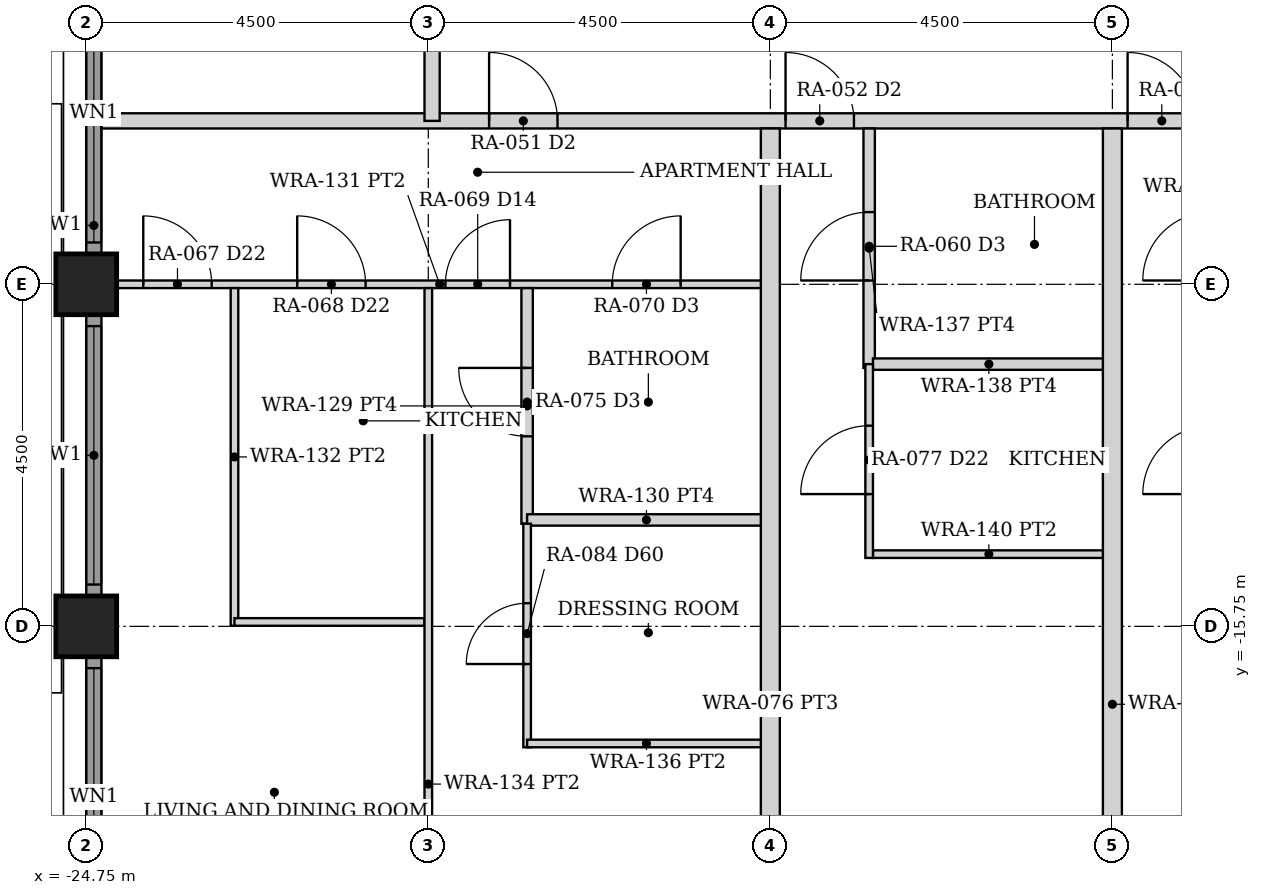
"""IFC4 building model, lengths in metres.
Left out: names, types, materials, properties, quantities, classifications, styles, units other than length and angle.
Written with IfcOpenShell. Run it as: python <this file> out.ifc"""

import sys

from ifc_helpers import new_model, si_unit, direction, frame, frame_2d, origin, origin_2d, place, context, subcontext, project, spatial, rectangle, hollow_rectangle, extrude, element, fill, save


model = new_model("IFC4")
c1 = context("Model", 3, precision=1e-05, world=origin(), true_north=direction((0.0, 1.0)))
c2 = subcontext(c1, "Body", "Model", "MODEL_VIEW")
j1 = project(units=[si_unit("LENGTHUNIT", "METRE"), si_unit("PLANEANGLEUNIT", "RADIAN")], contexts=[c1])
p1 = place(None, origin())
s1 = spatial("IfcSite", under=j1, at=p1, CompositionType="ELEMENT")
p2 = place(p1, origin())
s2 = spatial("IfcBuilding", under=s1, at=p2, CompositionType="ELEMENT")
p3 = place(p2, frame((0.0, 0.0, 26.5)))
s3 = spatial("IfcBuildingStorey", under=s2, at=p3, CompositionType="ELEMENT", Elevation=26.5)
for number, where, z_axis, x_axis in (
    (1, (-24.75, -15.75, 0.0), (0.0, 0.0, 1.0), (1.0, 0.0, 0.0)),
    (2, (-24.75, -11.25, 0.0), (0.0, 0.0, 1.0), (1.0, 0.0, 0.0)),
):
    element("IfcColumn", number, at=place(p3, frame(where, z_axis=z_axis, x_axis=x_axis)), inside=s3, PredefinedType="COLUMN", context=c2, shape_type="SweptSolid", body=[
        extrude(hollow_rectangle(XDim=0.8, YDim=0.8, WallThickness=0.08, at=origin_2d()), origin(), (0.0, 0.0, 1.0), 3.5),
    ])
p4 = place(p3, frame((-24.65, -19.845, 0.0), z_axis=(0.0, 0.0, 1.0), x_axis=(0.0, 1.0, 0.0)))
e3 = element("IfcWall", 3, at=p4, inside=s3, PredefinedType="SOLIDWALL", context=c2, shape_type="SweptSolid", body=[
    extrude(rectangle(XDim=3.69, YDim=0.2, at=frame_2d((1.845, 0.0))), origin(), (0.0, 0.0, 1.0), 2.379),
])
p5 = place(p4, frame((0.145, 0.0, 0.3)))
e4 = element("IfcOpeningElement", 4, at=p5, cuts=e3, PredefinedType="OPENING", context=c2, shape_type="SweptSolid", body=[
    extrude(rectangle(XDim=3.4, YDim=1.929, at=frame_2d((1.7, 0.964))), frame((0.0, 0.11, 0.0), z_axis=(0.0, -1.0, 0.0), x_axis=(1.0, 0.0, 0.0)), (0.0, 0.0, 1.0), 0.22),
])
p6 = place(p3, frame((-24.65, -15.345, 0.0), z_axis=(0.0, 0.0, 1.0), x_axis=(0.0, 1.0, 0.0)))
e5 = element("IfcWall", 5, at=p6, inside=s3, PredefinedType="SOLIDWALL", context=c2, shape_type="SweptSolid", body=[
    extrude(rectangle(XDim=3.69, YDim=0.2, at=frame_2d((1.845, 0.0))), origin(), (0.0, 0.0, 1.0), 2.379),
])
p7 = place(p6, frame((0.145, 0.0, 0.3)))
e6 = element("IfcOpeningElement", 6, at=p7, cuts=e5, PredefinedType="OPENING", context=c2, shape_type="SweptSolid", body=[
    extrude(rectangle(XDim=3.4, YDim=1.929, at=frame_2d((1.7, 0.964))), frame((0.0, 0.11, 0.0), z_axis=(0.0, -1.0, 0.0), x_axis=(1.0, 0.0, 0.0)), (0.0, 0.0, 1.0), 0.22),
])
p8 = place(p3, frame((-24.65, -10.845, 0.0), z_axis=(0.0, 0.0, 1.0), x_axis=(0.0, 1.0, 0.0)))
e7 = element("IfcWall", 7, at=p8, inside=s3, PredefinedType="SOLIDWALL", context=c2, shape_type="SweptSolid", body=[
    extrude(rectangle(XDim=3.69, YDim=0.2, at=frame_2d((1.845, 0.0))), origin(), (0.0, 0.0, 1.0), 2.379),
])
p9 = place(p8, frame((0.145, 0.0, 0.3)))
e8 = element("IfcOpeningElement", 8, at=p9, cuts=e7, PredefinedType="OPENING", context=c2, shape_type="SweptSolid", body=[
    extrude(rectangle(XDim=3.4, YDim=1.929, at=frame_2d((1.7, 0.964))), frame((0.0, 0.11, 0.0), z_axis=(0.0, -1.0, 0.0), x_axis=(1.0, 0.0, 0.0)), (0.0, 0.0, 1.0), 0.22),
])
p10 = place(p3, frame((-24.55, -9.1, 0.0), z_axis=(0.0, 0.0, 1.0), x_axis=(1.0, 0.0, 0.0)))
e9 = element("IfcWall", 9, at=p10, inside=s3, PredefinedType="PARTITIONING", context=c2, shape_type="SweptSolid", body=[
    extrude(rectangle(XDim=49.1, YDim=0.2, at=frame_2d((24.55, 0.0))), origin(), (0.0, 0.0, 1.0), 2.373),
])
p11 = place(p10, frame((5.1, 0.0, 0.0)))
e10 = element("IfcOpeningElement", 10, at=p11, cuts=e9, PredefinedType="OPENING", context=c2, shape_type="SweptSolid", body=[
    extrude(rectangle(XDim=0.9, YDim=2.1, at=frame_2d((0.45, 1.05))), frame((0.0, 0.11, 0.0), z_axis=(0.0, -1.0, 0.0), x_axis=(1.0, 0.0, 0.0)), (0.0, 0.0, 1.0), 0.22),
])
p12 = place(p10, frame((9.0, 0.0, 0.0)))
e11 = element("IfcOpeningElement", 11, at=p12, cuts=e9, PredefinedType="OPENING", context=c2, shape_type="SweptSolid", body=[
    extrude(rectangle(XDim=0.9, YDim=2.1, at=frame_2d((0.45, 1.05))), frame((0.0, 0.11, 0.0), z_axis=(0.0, -1.0, 0.0), x_axis=(1.0, 0.0, 0.0)), (0.0, 0.0, 1.0), 0.22),
])
p13 = place(p10, frame((13.5, 0.0, 0.0)))
e12 = element("IfcOpeningElement", 12, at=p13, cuts=e9, PredefinedType="OPENING", context=c2, shape_type="SweptSolid", body=[
    extrude(rectangle(XDim=0.9, YDim=2.1, at=frame_2d((0.45, 1.05))), frame((0.0, 0.11, 0.0), z_axis=(0.0, -1.0, 0.0), x_axis=(1.0, 0.0, 0.0)), (0.0, 0.0, 1.0), 0.22),
])
p14 = place(p10, frame((18.0, 0.0, 0.0)))
e13 = element("IfcOpeningElement", 13, at=p14, cuts=e9, PredefinedType="OPENING", context=c2, shape_type="SweptSolid", body=[
    extrude(rectangle(XDim=0.9, YDim=2.1, at=frame_2d((0.45, 1.05))), frame((0.0, 0.11, 0.0), z_axis=(0.0, -1.0, 0.0), x_axis=(1.0, 0.0, 0.0)), (0.0, 0.0, 1.0), 0.22),
])
p15 = place(p10, frame((22.5, 0.0, 0.0)))
e14 = element("IfcOpeningElement", 14, at=p15, cuts=e9, PredefinedType="OPENING", context=c2, shape_type="SweptSolid", body=[
    extrude(rectangle(XDim=0.9, YDim=2.1, at=frame_2d((0.45, 1.05))), frame((0.0, 0.11, 0.0), z_axis=(0.0, -1.0, 0.0), x_axis=(1.0, 0.0, 0.0)), (0.0, 0.0, 1.0), 0.22),
])
p16 = place(p10, frame((27.0, 0.0, 0.0)))
e15 = element("IfcOpeningElement", 15, at=p16, cuts=e9, PredefinedType="OPENING", context=c2, shape_type="SweptSolid", body=[
    extrude(rectangle(XDim=0.9, YDim=2.1, at=frame_2d((0.45, 1.05))), frame((0.0, 0.11, 0.0), z_axis=(0.0, -1.0, 0.0), x_axis=(1.0, 0.0, 0.0)), (0.0, 0.0, 1.0), 0.22),
])
p17 = place(p10, frame((31.5, 0.0, 0.0)))
e16 = element("IfcOpeningElement", 16, at=p17, cuts=e9, PredefinedType="OPENING", context=c2, shape_type="SweptSolid", body=[
    extrude(rectangle(XDim=0.9, YDim=2.1, at=frame_2d((0.45, 1.05))), frame((0.0, 0.11, 0.0), z_axis=(0.0, -1.0, 0.0), x_axis=(1.0, 0.0, 0.0)), (0.0, 0.0, 1.0), 0.22),
])
p18 = place(p10, frame((36.0, 0.0, 0.0)))
e17 = element("IfcOpeningElement", 17, at=p18, cuts=e9, PredefinedType="OPENING", context=c2, shape_type="SweptSolid", body=[
    extrude(rectangle(XDim=0.9, YDim=2.1, at=frame_2d((0.45, 1.05))), frame((0.0, 0.11, 0.0), z_axis=(0.0, -1.0, 0.0), x_axis=(1.0, 0.0, 0.0)), (0.0, 0.0, 1.0), 0.22),
])
p19 = place(p10, frame((43.1, 0.0, 0.0)))
e18 = element("IfcOpeningElement", 18, at=p19, cuts=e9, PredefinedType="OPENING", context=c2, shape_type="SweptSolid", body=[
    extrude(rectangle(XDim=0.9, YDim=2.1, at=frame_2d((0.45, 1.05))), frame((0.0, 0.11, 0.0), z_axis=(0.0, -1.0, 0.0), x_axis=(1.0, 0.0, 0.0)), (0.0, 0.0, 1.0), 0.22),
])
p20 = place(p3, frame((-20.2, -9.1, 0.0), z_axis=(0.0, 0.0, 1.0), x_axis=(0.0, 1.0, 0.0)))
e19 = element("IfcWall", 19, at=p20, inside=s3, PredefinedType="PARTITIONING", context=c2, shape_type="SweptSolid", body=[
    extrude(rectangle(XDim=18.2, YDim=0.2, at=frame_2d((9.1, 0.0))), origin(), (0.0, 0.0, 1.0), 2.373),
])
p21 = place(p20, frame((8.6, 0.0, 0.0)))
e20 = element("IfcOpeningElement", 20, at=p21, cuts=e19, PredefinedType="OPENING", context=c2, shape_type="SweptSolid", body=[
    extrude(rectangle(XDim=1.0, YDim=2.1, at=frame_2d((0.5, 1.05))), frame((0.0, 0.11, 0.0), z_axis=(0.0, -1.0, 0.0), x_axis=(1.0, 0.0, 0.0)), (0.0, 0.0, 1.0), 0.22),
])
p22 = place(p3, frame((-24.35, -11.25, 0.0), z_axis=(0.0, 0.0, 1.0), x_axis=(1.0, 0.0, 0.0)))
e21 = element("IfcWall", 21, at=p22, inside=s3, PredefinedType="PARTITIONING", context=c2, shape_type="SweptSolid", body=[
    extrude(rectangle(XDim=8.5, YDim=0.1, at=frame_2d((4.25, 0.0))), origin(), (0.0, 0.0, 1.0), 2.373),
])
p23 = place(p22, frame((2.375, 0.0, 0.0)))
e22 = element("IfcOpeningElement", 22, at=p23, cuts=e21, PredefinedType="OPENING", context=c2, shape_type="SweptSolid", body=[
    extrude(rectangle(XDim=0.9, YDim=2.1, at=frame_2d((0.45, 1.05))), frame((0.0, 0.06, 0.0), z_axis=(0.0, -1.0, 0.0), x_axis=(1.0, 0.0, 0.0)), (0.0, 0.0, 1.0), 0.12),
])
p24 = place(p22, frame((0.35, 0.0, 0.0)))
e23 = element("IfcOpeningElement", 23, at=p24, cuts=e21, PredefinedType="OPENING", context=c2, shape_type="SweptSolid", body=[
    extrude(rectangle(XDim=0.9, YDim=2.1, at=frame_2d((0.45, 1.05))), frame((0.0, 0.06, 0.0), z_axis=(0.0, -1.0, 0.0), x_axis=(1.0, 0.0, 0.0)), (0.0, 0.0, 1.0), 0.12),
])
p25 = place(p22, frame((4.325, 0.0, 0.0)))
e24 = element("IfcOpeningElement", 24, at=p25, cuts=e21, PredefinedType="OPENING", context=c2, shape_type="SweptSolid", body=[
    extrude(rectangle(XDim=0.85, YDim=2.1, at=frame_2d((0.425, 1.05))), frame((0.0, 0.06, 0.0), z_axis=(0.0, -1.0, 0.0), x_axis=(1.0, 0.0, 0.0)), (0.0, 0.0, 1.0), 0.12),
])
p26 = place(p22, frame((6.52, 0.0, 0.0)))
e25 = element("IfcOpeningElement", 25, at=p26, cuts=e21, PredefinedType="OPENING", context=c2, shape_type="SweptSolid", body=[
    extrude(rectangle(XDim=0.9, YDim=2.1, at=frame_2d((0.45, 1.05))), frame((0.0, 0.06, 0.0), z_axis=(0.0, -1.0, 0.0), x_axis=(1.0, 0.0, 0.0)), (0.0, 0.0, 1.0), 0.12),
])
p27 = place(p3, frame((-22.8, -15.742, 0.0), z_axis=(0.0, 0.0, 1.0), x_axis=(0.0, 1.0, 0.0)))
e26 = element("IfcWall", 26, at=p27, inside=s3, PredefinedType="PARTITIONING", context=c2, shape_type="SweptSolid", body=[
    extrude(rectangle(XDim=4.442, YDim=0.1, at=frame_2d((2.221, 0.0))), origin(), (0.0, 0.0, 1.0), 2.373),
])
p28 = place(p3, frame((-22.8, -15.692, 0.0), z_axis=(0.0, 0.0, 1.0), x_axis=(1.0, 0.0, 0.0)))
e27 = element("IfcWall", 27, at=p28, inside=s3, PredefinedType="PARTITIONING", context=c2, shape_type="SweptSolid", body=[
    extrude(rectangle(XDim=2.5, YDim=0.1, at=frame_2d((1.25, 0.0))), origin(), (0.0, 0.0, 1.0), 2.373),
])
p29 = place(p3, frame((-20.25, -24.35, 0.0), z_axis=(0.0, 0.0, 1.0), x_axis=(0.0, 1.0, 0.0)))
e28 = element("IfcWall", 28, at=p29, inside=s3, PredefinedType="PARTITIONING", context=c2, shape_type="SweptSolid", body=[
    extrude(rectangle(XDim=13.05, YDim=0.1, at=frame_2d((6.525, 0.0))), origin(), (0.0, 0.0, 1.0), 2.373),
])
p30 = place(p3, frame((-18.95, -14.4, 0.0), z_axis=(0.0, 0.0, 1.0), x_axis=(0.0, 1.0, 0.0)))
e29 = element("IfcWall", 29, at=p30, inside=s3, PredefinedType="PARTITIONING", context=c2, shape_type="SweptSolid", body=[
    extrude(rectangle(XDim=3.1, YDim=0.15, at=frame_2d((1.55, 0.0))), origin(), (0.0, 0.0, 1.0), 2.373),
])
p31 = place(p30, frame((1.15, 0.0, 0.0)))
e30 = element("IfcOpeningElement", 30, at=p31, cuts=e29, PredefinedType="OPENING", context=c2, shape_type="SweptSolid", body=[
    extrude(rectangle(XDim=0.9, YDim=2.1, at=frame_2d((0.45, 1.05))), frame((0.0, 0.085, 0.0), z_axis=(0.0, -1.0, 0.0), x_axis=(1.0, 0.0, 0.0)), (0.0, 0.0, 1.0), 0.17),
])
p32 = place(p3, frame((-18.95, -14.35, 0.0), z_axis=(0.0, 0.0, 1.0), x_axis=(1.0, 0.0, 0.0)))
e31 = element("IfcWall", 31, at=p32, inside=s3, PredefinedType="PARTITIONING", context=c2, shape_type="SweptSolid", body=[
    extrude(rectangle(XDim=3.14, YDim=0.15, at=frame_2d((1.57, 0.0))), origin(), (0.0, 0.0, 1.0), 2.373),
])
p33 = place(p3, frame((-18.95, -17.341, 0.0), z_axis=(0.0, 0.0, 1.0), x_axis=(0.0, 1.0, 0.0)))
e32 = element("IfcWall", 32, at=p33, inside=s3, PredefinedType="PARTITIONING", context=c2, shape_type="SweptSolid", body=[
    extrude(rectangle(XDim=2.941, YDim=0.1, at=frame_2d((1.47, 0.0))), origin(), (0.0, 0.0, 1.0), 2.373),
])
p34 = place(p33, frame((1.095, 0.0, 0.0)))
e33 = element("IfcOpeningElement", 33, at=p34, cuts=e32, PredefinedType="OPENING", context=c2, shape_type="SweptSolid", body=[
    extrude(rectangle(XDim=0.8, YDim=2.1, at=frame_2d((0.4, 1.05))), frame((0.0, 0.06, 0.0), z_axis=(0.0, -1.0, 0.0), x_axis=(1.0, 0.0, 0.0)), (0.0, 0.0, 1.0), 0.12),
])
p35 = place(p3, frame((-18.95, -17.291, 0.0), z_axis=(0.0, 0.0, 1.0), x_axis=(1.0, 0.0, 0.0)))
e34 = element("IfcWall", 34, at=p35, inside=s3, PredefinedType="PARTITIONING", context=c2, shape_type="SweptSolid", body=[
    extrude(rectangle(XDim=3.14, YDim=0.1, at=frame_2d((1.57, 0.0))), origin(), (0.0, 0.0, 1.0), 2.373),
])
p36 = place(p3, frame((-14.45, -12.35, 0.0), z_axis=(0.0, 0.0, 1.0), x_axis=(0.0, 1.0, 0.0)))
e35 = element("IfcWall", 35, at=p36, inside=s3, PredefinedType="PARTITIONING", context=c2, shape_type="SweptSolid", body=[
    extrude(rectangle(XDim=3.15, YDim=0.15, at=frame_2d((1.575, 0.0))), origin(), (0.0, 0.0, 1.0), 2.373),
])
p37 = place(p36, frame((1.15, 0.0, 0.0)))
e36 = element("IfcOpeningElement", 36, at=p37, cuts=e35, PredefinedType="OPENING", context=c2, shape_type="SweptSolid", body=[
    extrude(rectangle(XDim=0.9, YDim=2.1, at=frame_2d((0.45, 1.05))), frame((0.0, 0.085, 0.0), z_axis=(0.0, -1.0, 0.0), x_axis=(1.0, 0.0, 0.0)), (0.0, 0.0, 1.0), 0.17),
])
p38 = place(p3, frame((-14.4, -12.3, 0.0), z_axis=(0.0, 0.0, 1.0), x_axis=(1.0, 0.0, 0.0)))
e37 = element("IfcWall", 37, at=p38, inside=s3, PredefinedType="PARTITIONING", context=c2, shape_type="SweptSolid", body=[
    extrude(rectangle(XDim=3.05, YDim=0.15, at=frame_2d((1.525, 0.0))), origin(), (0.0, 0.0, 1.0), 2.373),
])
p39 = place(p3, frame((-14.4, -14.8, 0.0), z_axis=(0.0, 0.0, 1.0), x_axis=(1.0, 0.0, 0.0)))
e38 = element("IfcWall", 38, at=p39, inside=s3, PredefinedType="PARTITIONING", context=c2, shape_type="SweptSolid", body=[
    extrude(rectangle(XDim=3.05, YDim=0.1, at=frame_2d((1.525, 0.0))), origin(), (0.0, 0.0, 1.0), 2.373),
])
p40 = place(p3, frame((-14.45, -14.85, 0.0), z_axis=(0.0, 0.0, 1.0), x_axis=(0.0, 1.0, 0.0)))
e39 = element("IfcWall", 39, at=p40, inside=s3, PredefinedType="PARTITIONING", context=c2, shape_type="SweptSolid", body=[
    extrude(rectangle(XDim=2.55, YDim=0.1, at=frame_2d((1.275, 0.0))), origin(), (0.0, 0.0, 1.0), 2.373),
])
p41 = place(p40, frame((0.84, 0.0, 0.0)))
e40 = element("IfcOpeningElement", 40, at=p41, cuts=e39, PredefinedType="OPENING", context=c2, shape_type="SweptSolid", body=[
    extrude(rectangle(XDim=0.9, YDim=2.1, at=frame_2d((0.45, 1.05))), frame((0.0, 0.06, 0.0), z_axis=(0.0, -1.0, 0.0), x_axis=(1.0, 0.0, 0.0)), (0.0, 0.0, 1.0), 0.12),
])
for number, where, z_axis, x_axis in (
    (41, (-15.75, -24.35, 0.0), (0.0, 0.0, 1.0), (0.0, 1.0, 0.0)),
    (42, (-11.25, -24.35, 0.0), (0.0, 0.0, 1.0), (0.0, 1.0, 0.0)),
):
    element("IfcWall", number, at=place(p3, frame(where, z_axis=z_axis, x_axis=x_axis)), inside=s3, PredefinedType="PARTITIONING", context=c2, shape_type="SweptSolid", body=[
        extrude(rectangle(XDim=15.15, YDim=0.25, at=frame_2d((7.575, 0.0))), origin(), (0.0, 0.0, 1.0), 2.373),
    ])
p42 = place(p5, origin())
e43 = element("IfcWindow", 43, at=p42, inside=s3, PartitioningType="SINGLE_PANEL", PredefinedType="WINDOW", context=c2, shape_type="SweptSolid", body=[
    extrude(rectangle(XDim=3.4, YDim=1.929, at=frame_2d((1.7, 0.964))), frame((0.0, 0.03, 0.0), z_axis=(0.0, -1.0, 0.0), x_axis=(1.0, 0.0, 0.0)), (0.0, 0.0, 1.0), 0.06),
])
fill(e4, e43)
p43 = place(p7, origin())
e44 = element("IfcWindow", 44, at=p43, inside=s3, PartitioningType="SINGLE_PANEL", PredefinedType="WINDOW", context=c2, shape_type="SweptSolid", body=[
    extrude(rectangle(XDim=3.4, YDim=1.929, at=frame_2d((1.7, 0.964))), frame((0.0, 0.03, 0.0), z_axis=(0.0, -1.0, 0.0), x_axis=(1.0, 0.0, 0.0)), (0.0, 0.0, 1.0), 0.06),
])
fill(e6, e44)
p44 = place(p9, origin())
e45 = element("IfcWindow", 45, at=p44, inside=s3, PartitioningType="SINGLE_PANEL", PredefinedType="WINDOW", context=c2, shape_type="SweptSolid", body=[
    extrude(rectangle(XDim=3.4, YDim=1.929, at=frame_2d((1.7, 0.964))), frame((0.0, 0.03, 0.0), z_axis=(0.0, -1.0, 0.0), x_axis=(1.0, 0.0, 0.0)), (0.0, 0.0, 1.0), 0.06),
])
fill(e8, e45)
p45 = place(p11, origin())
e46 = element("IfcDoor", 46, at=p45, inside=s3, OperationType="SINGLE_SWING_LEFT", PredefinedType="DOOR", context=c2, shape_type="SweptSolid", body=[
    extrude(rectangle(XDim=0.9, YDim=2.1, at=frame_2d((0.45, 1.05))), frame((0.0, 0.025, 0.0), z_axis=(0.0, -1.0, 0.0), x_axis=(1.0, 0.0, 0.0)), (0.0, 0.0, 1.0), 0.05),
])
fill(e10, e46)
p46 = place(p23, origin())
e47 = element("IfcDoor", 47, at=p46, inside=s3, OperationType="SINGLE_SWING_LEFT", PredefinedType="DOOR", context=c2, shape_type="SweptSolid", body=[
    extrude(rectangle(XDim=0.9, YDim=2.1, at=frame_2d((0.45, 1.05))), frame((0.0, 0.025, 0.0), z_axis=(0.0, -1.0, 0.0), x_axis=(1.0, 0.0, 0.0)), (0.0, 0.0, 1.0), 0.05),
])
fill(e22, e47)
p47 = place(p24, origin())
e48 = element("IfcDoor", 48, at=p47, inside=s3, OperationType="SINGLE_SWING_LEFT", PredefinedType="DOOR", context=c2, shape_type="SweptSolid", body=[
    extrude(rectangle(XDim=0.9, YDim=2.1, at=frame_2d((0.45, 1.05))), frame((0.0, 0.025, 0.0), z_axis=(0.0, -1.0, 0.0), x_axis=(1.0, 0.0, 0.0)), (0.0, 0.0, 1.0), 0.05),
])
fill(e23, e48)
p48 = place(p25, origin())
e49 = element("IfcDoor", 49, at=p48, inside=s3, OperationType="SINGLE_SWING_RIGHT", PredefinedType="DOOR", context=c2, shape_type="SweptSolid", body=[
    extrude(rectangle(XDim=0.85, YDim=2.1, at=frame_2d((0.425, 1.05))), frame((0.0, 0.025, 0.0), z_axis=(0.0, -1.0, 0.0), x_axis=(1.0, 0.0, 0.0)), (0.0, 0.0, 1.0), 0.05),
])
fill(e24, e49)
p49 = place(p31, origin())
e50 = element("IfcDoor", 50, at=p49, inside=s3, OperationType="SINGLE_SWING_RIGHT", PredefinedType="DOOR", context=c2, shape_type="SweptSolid", body=[
    extrude(rectangle(XDim=0.9, YDim=2.1, at=frame_2d((0.45, 1.05))), frame((0.0, 0.025, 0.0), z_axis=(0.0, -1.0, 0.0), x_axis=(1.0, 0.0, 0.0)), (0.0, 0.0, 1.0), 0.05),
])
fill(e30, e50)
p50 = place(p26, origin())
e51 = element("IfcDoor", 51, at=p50, inside=s3, OperationType="SINGLE_SWING_RIGHT", PredefinedType="DOOR", context=c2, shape_type="SweptSolid", body=[
    extrude(rectangle(XDim=0.9, YDim=2.1, at=frame_2d((0.45, 1.05))), frame((0.0, 0.025, 0.0), z_axis=(0.0, -1.0, 0.0), x_axis=(1.0, 0.0, 0.0)), (0.0, 0.0, 1.0), 0.05),
])
fill(e25, e51)
p51 = place(p34, origin())
e52 = element("IfcDoor", 52, at=p51, inside=s3, OperationType="SINGLE_SWING_LEFT", PredefinedType="DOOR", context=c2, shape_type="SweptSolid", body=[
    extrude(rectangle(XDim=0.8, YDim=2.1, at=frame_2d((0.4, 1.05))), frame((0.0, 0.025, 0.0), z_axis=(0.0, -1.0, 0.0), x_axis=(1.0, 0.0, 0.0)), (0.0, 0.0, 1.0), 0.05),
])
fill(e33, e52)
p52 = place(p12, origin())
e53 = element("IfcDoor", 53, at=p52, inside=s3, OperationType="SINGLE_SWING_LEFT", PredefinedType="DOOR", context=c2, shape_type="SweptSolid", body=[
    extrude(rectangle(XDim=0.9, YDim=2.1, at=frame_2d((0.45, 1.05))), frame((0.0, 0.025, 0.0), z_axis=(0.0, -1.0, 0.0), x_axis=(1.0, 0.0, 0.0)), (0.0, 0.0, 1.0), 0.05),
])
fill(e11, e53)
p53 = place(p37, origin())
e54 = element("IfcDoor", 54, at=p53, inside=s3, OperationType="SINGLE_SWING_LEFT", PredefinedType="DOOR", context=c2, shape_type="SweptSolid", body=[
    extrude(rectangle(XDim=0.9, YDim=2.1, at=frame_2d((0.45, 1.05))), frame((0.0, 0.025, 0.0), z_axis=(0.0, -1.0, 0.0), x_axis=(1.0, 0.0, 0.0)), (0.0, 0.0, 1.0), 0.05),
])
fill(e36, e54)
p54 = place(p41, origin())
e55 = element("IfcDoor", 55, at=p54, inside=s3, OperationType="SINGLE_SWING_LEFT", PredefinedType="DOOR", context=c2, shape_type="SweptSolid", body=[
    extrude(rectangle(XDim=0.9, YDim=2.1, at=frame_2d((0.45, 1.05))), frame((0.0, 0.025, 0.0), z_axis=(0.0, -1.0, 0.0), x_axis=(1.0, 0.0, 0.0)), (0.0, 0.0, 1.0), 0.05),
])
fill(e40, e55)
p55 = place(p13, origin())
e56 = element("IfcDoor", 56, at=p55, inside=s3, OperationType="SINGLE_SWING_LEFT", PredefinedType="DOOR", context=c2, shape_type="SweptSolid", body=[
    extrude(rectangle(XDim=0.9, YDim=2.1, at=frame_2d((0.45, 1.05))), frame((0.0, 0.025, 0.0), z_axis=(0.0, -1.0, 0.0), x_axis=(1.0, 0.0, 0.0)), (0.0, 0.0, 1.0), 0.05),
])
fill(e12, e56)
save(model, sys.argv[1])
